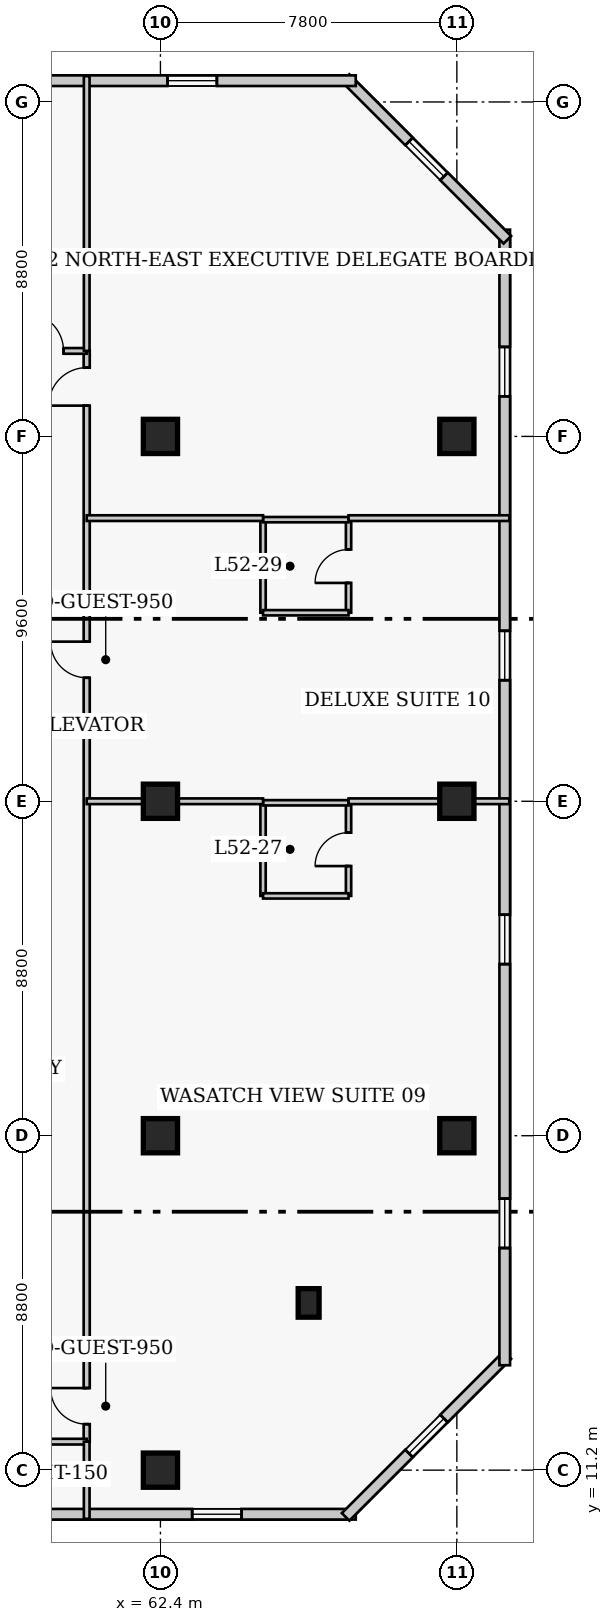
"""IFC4 building model, lengths in metres.
Left out: names, types, materials, properties, quantities, classifications, styles, units other than length and angle.
Written with IfcOpenShell. Run it as: python <this file> out.ifc"""

import sys

from ifc_helpers import new_model, si_unit, direction, frame, frame_2d, origin, origin_2d, place, context, subcontext, project, spatial, rectangle, extrude, element, fill, save


model = new_model("IFC4")
c1 = context("Model", 3, precision=1e-05, world=origin(), true_north=direction((0.0, 1.0)))
c2 = subcontext(c1, "Body", "Model", "MODEL_VIEW")
j1 = project(units=[si_unit("LENGTHUNIT", "METRE"), si_unit("PLANEANGLEUNIT", "RADIAN")], contexts=[c1])
p1 = place(None, origin())
s1 = spatial("IfcSite", under=j1, at=p1, CompositionType="ELEMENT")
p2 = place(p1, origin())
s2 = spatial("IfcBuilding", under=s1, at=p2, CompositionType="ELEMENT")
p3 = place(p2, frame((0.0, 0.0, 208.5)))
s3 = spatial("IfcBuildingStorey", under=s2, at=p3, CompositionType="ELEMENT", Elevation=208.5)
for number, where, z_axis, x_axis in (
    (1, (62.4, 11.2, 0.0), (0.0, 0.0, 1.0), (1.0, 0.0, 0.0)),
    (2, (62.4, 20.0, 0.0), (0.0, 0.0, 1.0), (1.0, 0.0, 0.0)),
    (3, (62.4, 28.8, 0.0), (0.0, 0.0, 1.0), (1.0, 0.0, 0.0)),
    (4, (62.4, 38.4, 0.0), (0.0, 0.0, 1.0), (1.0, 0.0, 0.0)),
    (5, (70.2, 20.0, 0.0), (0.0, 0.0, 1.0), (1.0, 0.0, 0.0)),
    (6, (70.2, 28.8, 0.0), (0.0, 0.0, 1.0), (1.0, 0.0, 0.0)),
    (7, (70.2, 38.4, 0.0), (0.0, 0.0, 1.0), (1.0, 0.0, 0.0)),
):
    element("IfcColumn", number, at=place(p3, frame(where, z_axis=z_axis, x_axis=x_axis)), inside=s3, PredefinedType="COLUMN", context=c2, shape_type="SweptSolid", body=[
        extrude(rectangle(XDim=0.9, YDim=0.9, at=origin_2d()), origin(), (0.0, 0.0, 1.0), 3.9),
    ])
p4 = place(p3, frame((66.3, 15.6, 0.0), z_axis=(0.0, 0.0, 1.0), x_axis=(1.0, 0.0, 0.0)))
e8 = element("IfcColumn", 8, at=p4, inside=s3, PredefinedType="PILASTER", context=c2, shape_type="SweptSolid", body=[
    extrude(rectangle(XDim=0.55, YDim=0.75, at=origin_2d()), origin(), (0.0, 0.0, 1.0), 3.9),
])
p5 = place(p3, frame((41.71, 10.04, 0.0), z_axis=(0.0, 0.0, 1.0), x_axis=(1.0, 0.0, 0.0)))
e9 = element("IfcWall", 9, at=p5, inside=s3, PredefinedType="SOLIDWALL", context=c2, shape_type="SweptSolid", body=[
    extrude(rectangle(XDim=25.83, YDim=0.28, at=frame_2d((12.915, 0.0))), origin(), (0.0, 0.0, 1.0), 3.65),
])
p6 = place(p5, frame((3.005, 0.0, 0.85)))
e10 = element("IfcOpeningElement", 10, at=p6, cuts=e9, PredefinedType="OPENING", context=c2, shape_type="SweptSolid", body=[
    extrude(rectangle(XDim=1.3, YDim=1.7, at=frame_2d((0.65, 0.85))), frame((0.0, 0.15, 0.0), z_axis=(0.0, -1.0, 0.0), x_axis=(1.0, 0.0, 0.0)), (0.0, 0.0, 1.0), 0.3),
])
p7 = place(p5, frame((13.415, 0.0, 0.85)))
e11 = element("IfcOpeningElement", 11, at=p7, cuts=e9, PredefinedType="OPENING", context=c2, shape_type="SweptSolid", body=[
    extrude(rectangle(XDim=1.3, YDim=1.7, at=frame_2d((0.65, 0.85))), frame((0.0, 0.15, 0.0), z_axis=(0.0, -1.0, 0.0), x_axis=(1.0, 0.0, 0.0)), (0.0, 0.0, 1.0), 0.3),
])
p8 = place(p5, frame((21.525, 0.0, 0.85)))
e12 = element("IfcOpeningElement", 12, at=p8, cuts=e9, PredefinedType="OPENING", context=c2, shape_type="SweptSolid", body=[
    extrude(rectangle(XDim=1.3, YDim=1.7, at=frame_2d((0.65, 0.85))), frame((0.0, 0.15, 0.0), z_axis=(0.0, -1.0, 0.0), x_axis=(1.0, 0.0, 0.0)), (0.0, 0.0, 1.0), 0.3),
])
p9 = place(p3, frame((67.273, 9.971, 0.0), z_axis=(0.0, 0.0, 1.0), x_axis=(0.707106781187, 0.707106781187, 0.0)))
e13 = element("IfcWall", 13, at=p9, inside=s3, PredefinedType="SOLIDWALL", context=c2, shape_type="SweptSolid", body=[
    extrude(rectangle(XDim=6.02, YDim=0.28, at=frame_2d((3.01, 0.0))), origin(), (0.0, 0.0, 1.0), 3.65),
])
p10 = place(p9, frame((2.36, 0.0, 0.85)))
e14 = element("IfcOpeningElement", 14, at=p10, cuts=e13, PredefinedType="OPENING", context=c2, shape_type="SweptSolid", body=[
    extrude(rectangle(XDim=1.3, YDim=1.7, at=frame_2d((0.65, 0.85))), frame((0.0, 0.15, 0.0), z_axis=(0.0, -1.0, 0.0), x_axis=(1.0, 0.0, 0.0)), (0.0, 0.0, 1.0), 0.3),
])
p11 = place(p3, frame((71.46, 13.96, 0.0), z_axis=(0.0, 0.0, 1.0), x_axis=(0.0, 1.0, 0.0)))
e15 = element("IfcWall", 15, at=p11, inside=s3, PredefinedType="SOLIDWALL", context=c2, shape_type="SweptSolid", body=[
    extrude(rectangle(XDim=29.88, YDim=0.28, at=frame_2d((14.94, 0.0))), origin(), (0.0, 0.0, 1.0), 3.65),
])
p12 = place(p11, frame((3.085, 0.0, 0.85)))
e16 = element("IfcOpeningElement", 16, at=p12, cuts=e15, PredefinedType="OPENING", context=c2, shape_type="SweptSolid", body=[
    extrude(rectangle(XDim=1.3, YDim=1.7, at=frame_2d((0.65, 0.85))), frame((0.0, 0.15, 0.0), z_axis=(0.0, -1.0, 0.0), x_axis=(1.0, 0.0, 0.0)), (0.0, 0.0, 1.0), 0.3),
])
p13 = place(p11, frame((10.555, 0.0, 0.85)))
e17 = element("IfcOpeningElement", 17, at=p13, cuts=e15, PredefinedType="OPENING", context=c2, shape_type="SweptSolid", body=[
    extrude(rectangle(XDim=1.3, YDim=1.7, at=frame_2d((0.65, 0.85))), frame((0.0, 0.15, 0.0), z_axis=(0.0, -1.0, 0.0), x_axis=(1.0, 0.0, 0.0)), (0.0, 0.0, 1.0), 0.3),
])
p14 = place(p11, frame((18.025, 0.0, 0.85)))
e18 = element("IfcOpeningElement", 18, at=p14, cuts=e15, PredefinedType="OPENING", context=c2, shape_type="SweptSolid", body=[
    extrude(rectangle(XDim=1.3, YDim=1.7, at=frame_2d((0.65, 0.85))), frame((0.0, 0.15, 0.0), z_axis=(0.0, -1.0, 0.0), x_axis=(1.0, 0.0, 0.0)), (0.0, 0.0, 1.0), 0.3),
])
p15 = place(p11, frame((25.495, 0.0, 0.85)))
e19 = element("IfcOpeningElement", 19, at=p15, cuts=e15, PredefinedType="OPENING", context=c2, shape_type="SweptSolid", body=[
    extrude(rectangle(XDim=1.3, YDim=1.7, at=frame_2d((0.65, 0.85))), frame((0.0, 0.15, 0.0), z_axis=(0.0, -1.0, 0.0), x_axis=(1.0, 0.0, 0.0)), (0.0, 0.0, 1.0), 0.3),
])
p16 = place(p3, frame((71.529, 43.573, 0.0), z_axis=(0.0, 0.0, 1.0), x_axis=(-0.707106781187, 0.707106781187, 0.0)))
e20 = element("IfcWall", 20, at=p16, inside=s3, PredefinedType="SOLIDWALL", context=c2, shape_type="SweptSolid", body=[
    extrude(rectangle(XDim=6.02, YDim=0.28, at=frame_2d((3.01, 0.0))), origin(), (0.0, 0.0, 1.0), 3.65),
])
p17 = place(p16, frame((2.36, 0.0, 0.85)))
e21 = element("IfcOpeningElement", 21, at=p17, cuts=e20, PredefinedType="OPENING", context=c2, shape_type="SweptSolid", body=[
    extrude(rectangle(XDim=1.3, YDim=1.7, at=frame_2d((0.65, 0.85))), frame((0.0, 0.15, 0.0), z_axis=(0.0, -1.0, 0.0), x_axis=(1.0, 0.0, 0.0)), (0.0, 0.0, 1.0), 0.3),
])
p18 = place(p3, frame((67.54, 47.76, 0.0), z_axis=(0.0, 0.0, 1.0), x_axis=(-1.0, 0.0, 0.0)))
e22 = element("IfcWall", 22, at=p18, inside=s3, PredefinedType="SOLIDWALL", context=c2, shape_type="SweptSolid", body=[
    extrude(rectangle(XDim=25.83, YDim=0.28, at=frame_2d((12.915, 0.0))), origin(), (0.0, 0.0, 1.0), 3.65),
])
p19 = place(p18, frame((3.655, 0.0, 0.85)))
e23 = element("IfcOpeningElement", 23, at=p19, cuts=e22, PredefinedType="OPENING", context=c2, shape_type="SweptSolid", body=[
    extrude(rectangle(XDim=1.3, YDim=1.7, at=frame_2d((0.65, 0.85))), frame((0.0, 0.15, 0.0), z_axis=(0.0, -1.0, 0.0), x_axis=(1.0, 0.0, 0.0)), (0.0, 0.0, 1.0), 0.3),
])
p20 = place(p18, frame((22.025, 0.0, 0.85)))
e24 = element("IfcOpeningElement", 24, at=p20, cuts=e22, PredefinedType="OPENING", context=c2, shape_type="SweptSolid", body=[
    extrude(rectangle(XDim=1.3, YDim=1.7, at=frame_2d((0.65, 0.85))), frame((0.0, 0.15, 0.0), z_axis=(0.0, -1.0, 0.0), x_axis=(1.0, 0.0, 0.0)), (0.0, 0.0, 1.0), 0.3),
])
p21 = place(p3, frame((60.46, 11.95, 0.0), z_axis=(0.0, 0.0, 1.0), x_axis=(0.0, 1.0, 0.0)))
e25 = element("IfcWall", 25, at=p21, inside=s3, PredefinedType="PARTITIONING", context=c2, shape_type="SweptSolid", body=[
    extrude(rectangle(XDim=28.7, YDim=0.16, at=frame_2d((14.35, 0.0))), origin(), (0.0, 0.0, 1.0), 3.65),
])
p22 = place(p21, frame((0.46, 0.0, 0.0)))
e26 = element("IfcOpeningElement", 26, at=p22, cuts=e25, PredefinedType="OPENING", context=c2, shape_type="SweptSolid", body=[
    extrude(rectangle(XDim=0.95, YDim=2.1, at=frame_2d((0.475, 1.05))), frame((0.0, 0.09, 0.0), z_axis=(0.0, -1.0, 0.0), x_axis=(1.0, 0.0, 0.0)), (0.0, 0.0, 1.0), 0.18),
])
p23 = place(p21, frame((20.1, 0.0, 0.0)))
e27 = element("IfcOpeningElement", 27, at=p23, cuts=e25, PredefinedType="OPENING", context=c2, shape_type="SweptSolid", body=[
    extrude(rectangle(XDim=0.95, YDim=2.1, at=frame_2d((0.475, 1.05))), frame((0.0, 0.09, 0.0), z_axis=(0.0, -1.0, 0.0), x_axis=(1.0, 0.0, 0.0)), (0.0, 0.0, 1.0), 0.18),
])
p24 = place(p21, frame((27.26, 0.0, 0.0)))
e28 = element("IfcOpeningElement", 28, at=p24, cuts=e25, PredefinedType="OPENING", context=c2, shape_type="SweptSolid", body=[
    extrude(rectangle(XDim=1.0, YDim=2.15, at=frame_2d((0.5, 1.075))), frame((0.0, 0.09, 0.0), z_axis=(0.0, -1.0, 0.0), x_axis=(1.0, 0.0, 0.0)), (0.0, 0.0, 1.0), 0.18),
])
p25 = place(p3, frame((58.24, 11.95, 0.0), z_axis=(0.0, 0.0, 1.0), x_axis=(1.0, 0.0, 0.0)))
e29 = element("IfcWall", 29, at=p25, inside=s3, PredefinedType="PARTITIONING", context=c2, shape_type="SweptSolid", body=[
    extrude(rectangle(XDim=2.22, YDim=0.15, at=frame_2d((1.11, 0.0))), origin(), (0.0, 0.0, 1.0), 3.65),
])
p26 = place(p3, frame((56.8, 40.65, 0.0), z_axis=(0.0, 0.0, 1.0), x_axis=(1.0, 0.0, 0.0)))
e30 = element("IfcWall", 30, at=p26, inside=s3, PredefinedType="PARTITIONING", context=c2, shape_type="SweptSolid", body=[
    extrude(rectangle(XDim=3.66, YDim=0.15, at=frame_2d((1.83, 0.0))), origin(), (0.0, 0.0, 1.0), 3.65),
])
p27 = place(p26, frame((2.05, 0.0, 0.0)))
e31 = element("IfcOpeningElement", 31, at=p27, cuts=e30, PredefinedType="OPENING", context=c2, shape_type="SweptSolid", body=[
    extrude(rectangle(XDim=1.0, YDim=2.15, at=frame_2d((0.5, 1.075))), frame((0.0, 0.085, 0.0), z_axis=(0.0, -1.0, 0.0), x_axis=(1.0, 0.0, 0.0)), (0.0, 0.0, 1.0), 0.17),
])
p28 = place(p3, frame((60.46, 40.65, 0.0), z_axis=(0.0, 0.0, 1.0), x_axis=(0.0, 1.0, 0.0)))
e32 = element("IfcWall", 32, at=p28, inside=s3, PredefinedType="PARTITIONING", context=c2, shape_type="SweptSolid", body=[
    extrude(rectangle(XDim=7.23, YDim=0.15, at=frame_2d((3.615, 0.0))), origin(), (0.0, 0.0, 1.0), 3.65),
])
p29 = place(p3, frame((60.46, 9.92, 0.0), z_axis=(0.0, 0.0, 1.0), x_axis=(0.0, 1.0, 0.0)))
e33 = element("IfcWall", 33, at=p29, inside=s3, PredefinedType="PARTITIONING", context=c2, shape_type="SweptSolid", body=[
    extrude(rectangle(XDim=2.03, YDim=0.15, at=frame_2d((1.015, 0.0))), origin(), (0.0, 0.0, 1.0), 3.65),
])
p30 = place(p3, frame((65.1, 26.31, 0.0), z_axis=(0.0, 0.0, 1.0), x_axis=(0.0, 1.0, 0.0)))
e34 = element("IfcWall", 34, at=p30, inside=s3, PredefinedType="PLUMBINGWALL", context=c2, shape_type="SweptSolid", body=[
    extrude(rectangle(XDim=2.45, YDim=0.14, at=frame_2d((1.225, 0.0))), origin(), (0.0, 0.0, 1.0), 3.65),
])
p31 = place(p3, frame((67.35, 26.31, 0.0), z_axis=(0.0, 0.0, 1.0), x_axis=(0.0, 1.0, 0.0)))
e35 = element("IfcWall", 35, at=p31, inside=s3, PredefinedType="PLUMBINGWALL", context=c2, shape_type="SweptSolid", body=[
    extrude(rectangle(XDim=2.45, YDim=0.14, at=frame_2d((1.225, 0.0))), origin(), (0.0, 0.0, 1.0), 3.65),
])
p32 = place(p31, frame((0.785, 0.0, 0.0)))
e36 = element("IfcOpeningElement", 36, at=p32, cuts=e35, PredefinedType="OPENING", context=c2, shape_type="SweptSolid", body=[
    extrude(rectangle(XDim=0.88, YDim=2.05, at=frame_2d((0.44, 1.025))), frame((0.0, 0.08, 0.0), z_axis=(0.0, -1.0, 0.0), x_axis=(1.0, 0.0, 0.0)), (0.0, 0.0, 1.0), 0.16),
])
p33 = place(p3, frame((65.1, 26.31, 0.0), z_axis=(0.0, 0.0, 1.0), x_axis=(1.0, 0.0, 0.0)))
e37 = element("IfcWall", 37, at=p33, inside=s3, PredefinedType="PLUMBINGWALL", context=c2, shape_type="SweptSolid", body=[
    extrude(rectangle(XDim=2.25, YDim=0.14, at=frame_2d((1.125, 0.0))), origin(), (0.0, 0.0, 1.0), 3.65),
])
p34 = place(p3, frame((65.1, 28.76, 0.0), z_axis=(0.0, 0.0, 1.0), x_axis=(1.0, 0.0, 0.0)))
e38 = element("IfcWall", 38, at=p34, inside=s3, PredefinedType="PLUMBINGWALL", context=c2, shape_type="SweptSolid", body=[
    extrude(rectangle(XDim=2.25, YDim=0.14, at=frame_2d((1.125, 0.0))), origin(), (0.0, 0.0, 1.0), 3.038),
])
p35 = place(p3, frame((60.46, 28.8, 0.0), z_axis=(0.0, 0.0, 1.0), x_axis=(1.0, 0.0, 0.0)))
e39 = element("IfcWall", 39, at=p35, inside=s3, PredefinedType="PARTITIONING", context=c2, shape_type="SweptSolid", body=[
    extrude(rectangle(XDim=4.64, YDim=0.15, at=frame_2d((2.32, 0.0))), origin(), (0.0, 0.0, 1.0), 2.878),
])
p36 = place(p3, frame((67.35, 28.8, 0.0), z_axis=(0.0, 0.0, 1.0), x_axis=(1.0, 0.0, 0.0)))
e40 = element("IfcWall", 40, at=p36, inside=s3, PredefinedType="PARTITIONING", context=c2, shape_type="SweptSolid", body=[
    extrude(rectangle(XDim=4.23, YDim=0.15, at=frame_2d((2.115, 0.0))), origin(), (0.0, 0.0, 1.0), 2.878),
])
p37 = place(p3, frame((65.1, 33.76, 0.0), z_axis=(0.0, 0.0, 1.0), x_axis=(0.0, 1.0, 0.0)))
e41 = element("IfcWall", 41, at=p37, inside=s3, PredefinedType="PLUMBINGWALL", context=c2, shape_type="SweptSolid", body=[
    extrude(rectangle(XDim=2.45, YDim=0.14, at=frame_2d((1.225, 0.0))), origin(), (0.0, 0.0, 1.0), 3.65),
])
p38 = place(p3, frame((67.35, 33.76, 0.0), z_axis=(0.0, 0.0, 1.0), x_axis=(0.0, 1.0, 0.0)))
e42 = element("IfcWall", 42, at=p38, inside=s3, PredefinedType="PLUMBINGWALL", context=c2, shape_type="SweptSolid", body=[
    extrude(rectangle(XDim=2.45, YDim=0.14, at=frame_2d((1.225, 0.0))), origin(), (0.0, 0.0, 1.0), 3.65),
])
p39 = place(p38, frame((0.785, 0.0, 0.0)))
e43 = element("IfcOpeningElement", 43, at=p39, cuts=e42, PredefinedType="OPENING", context=c2, shape_type="SweptSolid", body=[
    extrude(rectangle(XDim=0.88, YDim=2.05, at=frame_2d((0.44, 1.025))), frame((0.0, 0.08, 0.0), z_axis=(0.0, -1.0, 0.0), x_axis=(1.0, 0.0, 0.0)), (0.0, 0.0, 1.0), 0.16),
])
for number, where, z_axis, x_axis in (
    (44, (65.1, 33.76, 0.0), (0.0, 0.0, 1.0), (1.0, 0.0, 0.0)),
    (45, (65.1, 36.21, 0.0), (0.0, 0.0, 1.0), (1.0, 0.0, 0.0)),
):
    element("IfcWall", number, at=place(p3, frame(where, z_axis=z_axis, x_axis=x_axis)), inside=s3, PredefinedType="PLUMBINGWALL", context=c2, shape_type="SweptSolid", body=[
        extrude(rectangle(XDim=2.25, YDim=0.14, at=frame_2d((1.125, 0.0))), origin(), (0.0, 0.0, 1.0), 3.65),
    ])
p40 = place(p3, frame((60.46, 36.25, 0.0), z_axis=(0.0, 0.0, 1.0), x_axis=(1.0, 0.0, 0.0)))
e46 = element("IfcWall", 46, at=p40, inside=s3, PredefinedType="PARTITIONING", context=c2, shape_type="SweptSolid", body=[
    extrude(rectangle(XDim=4.64, YDim=0.15, at=frame_2d((2.32, 0.0))), origin(), (0.0, 0.0, 1.0), 3.65),
])
p41 = place(p3, frame((67.35, 36.25, 0.0), z_axis=(0.0, 0.0, 1.0), x_axis=(1.0, 0.0, 0.0)))
e47 = element("IfcWall", 47, at=p41, inside=s3, PredefinedType="PARTITIONING", context=c2, shape_type="SweptSolid", body=[
    extrude(rectangle(XDim=4.23, YDim=0.15, at=frame_2d((2.115, 0.0))), origin(), (0.0, 0.0, 1.0), 3.65),
])
p42 = place(p8, origin())
e48 = element("IfcWindow", 48, at=p42, inside=s3, PartitioningType="SINGLE_PANEL", PredefinedType="WINDOW", context=c2, shape_type="SweptSolid", body=[
    extrude(rectangle(XDim=1.3, YDim=1.7, at=frame_2d((0.65, 0.85))), frame((0.0, 0.03, 0.0), z_axis=(0.0, -1.0, 0.0), x_axis=(1.0, 0.0, 0.0)), (0.0, 0.0, 1.0), 0.06),
])
fill(e12, e48)
p43 = place(p10, origin())
e49 = element("IfcWindow", 49, at=p43, inside=s3, PartitioningType="SINGLE_PANEL", PredefinedType="WINDOW", context=c2, shape_type="SweptSolid", body=[
    extrude(rectangle(XDim=1.3, YDim=1.7, at=frame_2d((0.65, 0.85))), frame((0.0, 0.03, 0.0), z_axis=(0.0, -1.0, 0.0), x_axis=(1.0, 0.0, 0.0)), (0.0, 0.0, 1.0), 0.06),
])
fill(e14, e49)
p44 = place(p12, origin())
e50 = element("IfcWindow", 50, at=p44, inside=s3, PartitioningType="SINGLE_PANEL", PredefinedType="WINDOW", context=c2, shape_type="SweptSolid", body=[
    extrude(rectangle(XDim=1.3, YDim=1.7, at=frame_2d((0.65, 0.85))), frame((0.0, 0.03, 0.0), z_axis=(0.0, -1.0, 0.0), x_axis=(1.0, 0.0, 0.0)), (0.0, 0.0, 1.0), 0.06),
])
fill(e16, e50)
p45 = place(p13, origin())
e51 = element("IfcWindow", 51, at=p45, inside=s3, PartitioningType="SINGLE_PANEL", PredefinedType="WINDOW", context=c2, shape_type="SweptSolid", body=[
    extrude(rectangle(XDim=1.3, YDim=1.7, at=frame_2d((0.65, 0.85))), frame((0.0, 0.03, 0.0), z_axis=(0.0, -1.0, 0.0), x_axis=(1.0, 0.0, 0.0)), (0.0, 0.0, 1.0), 0.06),
])
fill(e17, e51)
p46 = place(p14, origin())
e52 = element("IfcWindow", 52, at=p46, inside=s3, PartitioningType="SINGLE_PANEL", PredefinedType="WINDOW", context=c2, shape_type="SweptSolid", body=[
    extrude(rectangle(XDim=1.3, YDim=1.7, at=frame_2d((0.65, 0.85))), frame((0.0, 0.03, 0.0), z_axis=(0.0, -1.0, 0.0), x_axis=(1.0, 0.0, 0.0)), (0.0, 0.0, 1.0), 0.06),
])
fill(e18, e52)
p47 = place(p15, origin())
e53 = element("IfcWindow", 53, at=p47, inside=s3, PartitioningType="SINGLE_PANEL", PredefinedType="WINDOW", context=c2, shape_type="SweptSolid", body=[
    extrude(rectangle(XDim=1.3, YDim=1.7, at=frame_2d((0.65, 0.85))), frame((0.0, 0.03, 0.0), z_axis=(0.0, -1.0, 0.0), x_axis=(1.0, 0.0, 0.0)), (0.0, 0.0, 1.0), 0.06),
])
fill(e19, e53)
p48 = place(p17, origin())
e54 = element("IfcWindow", 54, at=p48, inside=s3, PartitioningType="SINGLE_PANEL", PredefinedType="WINDOW", context=c2, shape_type="SweptSolid", body=[
    extrude(rectangle(XDim=1.3, YDim=1.7, at=frame_2d((0.65, 0.85))), frame((0.0, 0.03, 0.0), z_axis=(0.0, -1.0, 0.0), x_axis=(1.0, 0.0, 0.0)), (0.0, 0.0, 1.0), 0.06),
])
fill(e21, e54)
p49 = place(p19, origin())
e55 = element("IfcWindow", 55, at=p49, inside=s3, PartitioningType="SINGLE_PANEL", PredefinedType="WINDOW", context=c2, shape_type="SweptSolid", body=[
    extrude(rectangle(XDim=1.3, YDim=1.7, at=frame_2d((0.65, 0.85))), frame((0.0, 0.03, 0.0), z_axis=(0.0, -1.0, 0.0), x_axis=(1.0, 0.0, 0.0)), (0.0, 0.0, 1.0), 0.06),
])
fill(e23, e55)
p50 = place(p27, origin())
e56 = element("IfcDoor", 56, at=p50, inside=s3, OperationType="SINGLE_SWING_LEFT", PredefinedType="DOOR", context=c2, shape_type="SweptSolid", body=[
    extrude(rectangle(XDim=1.0, YDim=2.15, at=frame_2d((0.5, 1.075))), frame((0.0, 0.025, 0.0), z_axis=(0.0, -1.0, 0.0), x_axis=(1.0, 0.0, 0.0)), (0.0, 0.0, 1.0), 0.05),
])
fill(e31, e56)
p51 = place(p32, origin())
e57 = element("IfcDoor", 57, at=p51, inside=s3, OperationType="SINGLE_SWING_LEFT", PredefinedType="DOOR", context=c2, shape_type="SweptSolid", body=[
    extrude(rectangle(XDim=0.88, YDim=2.05, at=frame_2d((0.44, 1.025))), frame((0.0, 0.025, 0.0), z_axis=(0.0, -1.0, 0.0), x_axis=(1.0, 0.0, 0.0)), (0.0, 0.0, 1.0), 0.05),
])
fill(e36, e57)
p52 = place(p22, origin())
e58 = element("IfcDoor", 58, at=p52, inside=s3, OperationType="SINGLE_SWING_RIGHT", PredefinedType="DOOR", context=c2, shape_type="SweptSolid", body=[
    extrude(rectangle(XDim=0.95, YDim=2.1, at=frame_2d((0.475, 1.05))), frame((0.0, 0.025, 0.0), z_axis=(0.0, -1.0, 0.0), x_axis=(1.0, 0.0, 0.0)), (0.0, 0.0, 1.0), 0.05),
])
fill(e26, e58)
p53 = place(p39, origin())
e59 = element("IfcDoor", 59, at=p53, inside=s3, OperationType="SINGLE_SWING_LEFT", PredefinedType="DOOR", context=c2, shape_type="SweptSolid", body=[
    extrude(rectangle(XDim=0.88, YDim=2.05, at=frame_2d((0.44, 1.025))), frame((0.0, 0.025, 0.0), z_axis=(0.0, -1.0, 0.0), x_axis=(1.0, 0.0, 0.0)), (0.0, 0.0, 1.0), 0.05),
])
fill(e43, e59)
p54 = place(p23, origin())
e60 = element("IfcDoor", 60, at=p54, inside=s3, OperationType="SINGLE_SWING_RIGHT", PredefinedType="DOOR", context=c2, shape_type="SweptSolid", body=[
    extrude(rectangle(XDim=0.95, YDim=2.1, at=frame_2d((0.475, 1.05))), frame((0.0, 0.025, 0.0), z_axis=(0.0, -1.0, 0.0), x_axis=(1.0, 0.0, 0.0)), (0.0, 0.0, 1.0), 0.05),
])
fill(e27, e60)
p55 = place(p24, origin())
e61 = element("IfcDoor", 61, at=p55, inside=s3, OperationType="SINGLE_SWING_LEFT", PredefinedType="DOOR", context=c2, shape_type="SweptSolid", body=[
    extrude(rectangle(XDim=1.0, YDim=2.15, at=frame_2d((0.5, 1.075))), frame((0.0, 0.025, 0.0), z_axis=(0.0, -1.0, 0.0), x_axis=(1.0, 0.0, 0.0)), (0.0, 0.0, 1.0), 0.05),
])
fill(e28, e61)
save(model, sys.argv[1])
